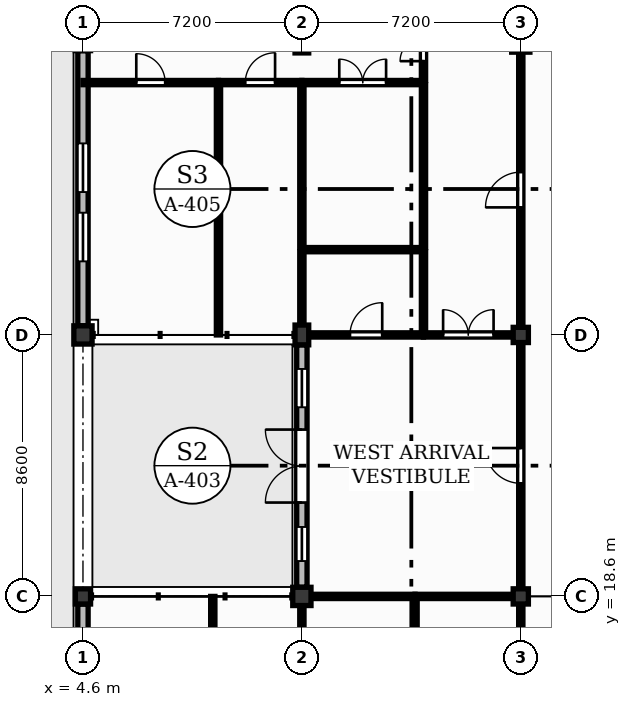
"""IFC4 building model, lengths in metres.
Left out: names, types, materials, properties, quantities, classifications, styles, units other than length and angle.
Written with IfcOpenShell. Run it as: python <this file> out.ifc"""

import sys

from ifc_helpers import new_model, si_unit, direction, frame, frame_2d, origin, origin_2d, place, context, subcontext, project, spatial, rectangle, extrude, element, fill, save


model = new_model("IFC4")
c1 = context("Model", 3, precision=1e-05, world=origin(), true_north=direction((0.0, 1.0)))
c2 = subcontext(c1, "Body", "Model", "MODEL_VIEW")
j1 = project(units=[si_unit("LENGTHUNIT", "METRE"), si_unit("PLANEANGLEUNIT", "RADIAN")], contexts=[c1])
p1 = place(None, origin())
s1 = spatial("IfcSite", under=j1, at=p1, CompositionType="ELEMENT")
p2 = place(p1, origin())
s2 = spatial("IfcBuilding", under=s1, at=p2, CompositionType="ELEMENT")
p3 = place(p2, origin())
s3 = spatial("IfcBuildingStorey", under=s2, at=p3, CompositionType="ELEMENT", Elevation=0.0)
p4 = place(p3, frame((4.6, 18.6, 0.0), z_axis=(0.0, 0.0, 1.0), x_axis=(1.0, 0.0, 0.0)))
e1 = element("IfcColumn", 1, at=p4, inside=s3, PredefinedType="COLUMN", context=c2, shape_type="SweptSolid", body=[
    extrude(rectangle(XDim=0.5, YDim=0.5, at=origin_2d()), origin(), (0.0, 0.0, 1.0), 4.2),
])
for number, where, z_axis, x_axis in (
    (2, (4.6, 27.2, 0.0), (0.0, 0.0, 1.0), (1.0, 0.0, 0.0)),
    (3, (11.8, 18.6, 0.0), (0.0, 0.0, 1.0), (1.0, 0.0, 0.0)),
):
    element("IfcColumn", number, at=place(p3, frame(where, z_axis=z_axis, x_axis=x_axis)), inside=s3, PredefinedType="COLUMN", context=c2, shape_type="SweptSolid", body=[
        extrude(rectangle(XDim=0.6, YDim=0.6, at=origin_2d()), origin(), (0.0, 0.0, 1.0), 4.2),
    ])
for number, where, z_axis, x_axis in (
    (4, (11.8, 27.2, 0.0), (0.0, 0.0, 1.0), (1.0, 0.0, 0.0)),
    (5, (11.8, 36.8, 0.0), (0.0, 0.0, 1.0), (1.0, 0.0, 0.0)),
):
    element("IfcColumn", number, at=place(p3, frame(where, z_axis=z_axis, x_axis=x_axis)), inside=s3, PredefinedType="COLUMN", context=c2, shape_type="SweptSolid", body=[
        extrude(rectangle(XDim=0.45, YDim=0.65, at=origin_2d()), origin(), (0.0, 0.0, 1.0), 4.2),
    ])
for number, where, z_axis, x_axis in (
    (6, (19.0, 18.6, 0.0), (0.0, 0.0, 1.0), (1.0, 0.0, 0.0)),
    (7, (19.0, 27.2, 0.0), (0.0, 0.0, 1.0), (1.0, 0.0, 0.0)),
):
    element("IfcColumn", number, at=place(p3, frame(where, z_axis=z_axis, x_axis=x_axis)), inside=s3, PredefinedType="COLUMN", context=c2, shape_type="SweptSolid", body=[
        extrude(rectangle(XDim=0.5, YDim=0.5, at=origin_2d()), origin(), (0.0, 0.0, 1.0), 4.2),
    ])
p5 = place(p3, frame((4.6, 11.65, 0.0), z_axis=(0.0, 0.0, 1.0), x_axis=(0.0, 1.0, 0.0)))
e8 = element("IfcWall", 8, at=p5, inside=s3, PredefinedType="SOLIDWALL", context=c2, shape_type="SweptSolid", body=[
    extrude(rectangle(XDim=6.7, YDim=0.34, at=frame_2d((3.35, 0.0))), origin(), (0.0, 0.0, 1.0), 3.68),
])
p6 = place(p5, frame((3.425, 0.0, 1.0)))
e9 = element("IfcOpeningElement", 9, at=p6, cuts=e8, PredefinedType="OPENING", context=c2, shape_type="SweptSolid", body=[
    extrude(rectangle(XDim=1.48, YDim=2.2, at=frame_2d((0.74, 1.1))), frame((0.0, 0.18, 0.0), z_axis=(0.0, -1.0, 0.0), x_axis=(1.0, 0.0, 0.0)), (0.0, 0.0, 1.0), 0.36),
])
p7 = place(p3, frame((4.6, 27.5, 0.0), z_axis=(0.0, 0.0, 1.0), x_axis=(0.0, 1.0, 0.0)))
e10 = element("IfcWall", 10, at=p7, inside=s3, PredefinedType="SOLIDWALL", context=c2, shape_type="SweptSolid", body=[
    extrude(rectangle(XDim=9.05, YDim=0.34, at=frame_2d((4.525, 0.0))), origin(), (0.0, 0.0, 1.0), 3.68),
])
p8 = place(p7, frame((2.12, 0.0, 1.0)))
e11 = element("IfcOpeningElement", 11, at=p8, cuts=e10, PredefinedType="OPENING", context=c2, shape_type="SweptSolid", body=[
    extrude(rectangle(XDim=1.6, YDim=2.2, at=frame_2d((0.8, 1.1))), frame((0.0, 0.18, 0.0), z_axis=(0.0, -1.0, 0.0), x_axis=(1.0, 0.0, 0.0)), (0.0, 0.0, 1.0), 0.36),
])
p9 = place(p7, frame((4.4, 0.0, 1.0)))
e12 = element("IfcOpeningElement", 12, at=p9, cuts=e10, PredefinedType="OPENING", context=c2, shape_type="SweptSolid", body=[
    extrude(rectangle(XDim=1.6, YDim=2.2, at=frame_2d((0.8, 1.1))), frame((0.0, 0.18, 0.0), z_axis=(0.0, -1.0, 0.0), x_axis=(1.0, 0.0, 0.0)), (0.0, 0.0, 1.0), 0.36),
])
p10 = place(p3, frame((11.8, 18.9, 0.0), z_axis=(0.0, 0.0, 1.0), x_axis=(0.0, 1.0, 0.0)))
e13 = element("IfcWall", 13, at=p10, inside=s3, PredefinedType="SOLIDWALL", context=c2, shape_type="SweptSolid", body=[
    extrude(rectangle(XDim=7.975, YDim=0.34, at=frame_2d((3.988, 0.0))), origin(), (0.0, 0.0, 1.0), 3.68),
])
p11 = place(p10, frame((2.788, 0.0, 0.0)))
e14 = element("IfcOpeningElement", 14, at=p11, cuts=e13, PredefinedType="OPENING", context=c2, shape_type="SweptSolid", body=[
    extrude(rectangle(XDim=2.4, YDim=2.8, at=frame_2d((1.2, 1.4))), frame((0.0, 0.18, 0.0), z_axis=(0.0, -1.0, 0.0), x_axis=(1.0, 0.0, 0.0)), (0.0, 0.0, 1.0), 0.36),
])
p12 = place(p10, frame((0.864, 0.0, 1.05)))
e15 = element("IfcOpeningElement", 15, at=p12, cuts=e13, PredefinedType="OPENING", context=c2, shape_type="SweptSolid", body=[
    extrude(rectangle(XDim=1.12, YDim=1.65, at=frame_2d((0.56, 0.825))), frame((0.0, 0.18, 0.0), z_axis=(0.0, -1.0, 0.0), x_axis=(1.0, 0.0, 0.0)), (0.0, 0.0, 1.0), 0.36),
])
p13 = place(p10, frame((5.921, 0.0, 1.05)))
e16 = element("IfcOpeningElement", 16, at=p13, cuts=e13, PredefinedType="OPENING", context=c2, shape_type="SweptSolid", body=[
    extrude(rectangle(XDim=1.26, YDim=1.65, at=frame_2d((0.63, 0.825))), frame((0.0, 0.18, 0.0), z_axis=(0.0, -1.0, 0.0), x_axis=(1.0, 0.0, 0.0)), (0.0, 0.0, 1.0), 0.36),
])
p14 = place(p3, frame((4.6, 35.5, 0.0), z_axis=(0.0, 0.0, 1.0), x_axis=(1.0, 0.0, 0.0)))
e17 = element("IfcWall", 17, at=p14, inside=s3, PredefinedType="PARTITIONING", context=c2, shape_type="SweptSolid", body=[
    extrude(rectangle(XDim=4.457, YDim=0.14, at=frame_2d((2.229, 0.0))), origin(), (0.0, 0.0, 1.0), 4.18),
])
p15 = place(p14, frame((1.753, 0.0, 0.0)))
e18 = element("IfcOpeningElement", 18, at=p15, cuts=e17, PredefinedType="OPENING", context=c2, shape_type="SweptSolid", body=[
    extrude(rectangle(XDim=0.95, YDim=2.1, at=frame_2d((0.475, 1.05))), frame((0.0, 0.08, 0.0), z_axis=(0.0, -1.0, 0.0), x_axis=(1.0, 0.0, 0.0)), (0.0, 0.0, 1.0), 0.16),
])
p16 = place(p3, frame((8.87, 13.47, 0.0), z_axis=(0.0, 0.0, 1.0), x_axis=(0.0, 1.0, 0.0)))
e19 = element("IfcWall", 19, at=p16, inside=s3, PredefinedType="PARTITIONING", context=c2, shape_type="SweptSolid", body=[
    extrude(rectangle(XDim=5.13, YDim=0.14, at=frame_2d((2.565, 0.0))), origin(), (0.0, 0.0, 1.0), 4.18),
])
p17 = place(p3, frame((9.057, 27.2, 0.0), z_axis=(0.0, 0.0, 1.0), x_axis=(0.0, 1.0, 0.0)))
e20 = element("IfcWall", 20, at=p17, inside=s3, PredefinedType="PARTITIONING", context=c2, shape_type="SweptSolid", body=[
    extrude(rectangle(XDim=8.23, YDim=0.14, at=frame_2d((4.115, 0.0))), origin(), (0.0, 0.0, 1.0), 4.18),
])
p18 = place(p3, frame((9.057, 35.5, 0.0), z_axis=(0.0, 0.0, 1.0), x_axis=(1.0, 0.0, 0.0)))
e21 = element("IfcWall", 21, at=p18, inside=s3, PredefinedType="PARTITIONING", context=c2, shape_type="SweptSolid", body=[
    extrude(rectangle(XDim=2.743, YDim=0.14, at=frame_2d((1.372, 0.0))), origin(), (0.0, 0.0, 1.0), 4.18),
])
p19 = place(p18, frame((0.882, 0.0, 0.0)))
e22 = element("IfcOpeningElement", 22, at=p19, cuts=e21, PredefinedType="OPENING", context=c2, shape_type="SweptSolid", body=[
    extrude(rectangle(XDim=0.98, YDim=2.15, at=frame_2d((0.49, 1.075))), frame((0.0, 0.08, 0.0), z_axis=(0.0, -1.0, 0.0), x_axis=(1.0, 0.0, 0.0)), (0.0, 0.0, 1.0), 0.16),
])
p20 = place(p3, frame((11.8, 13.47, 0.0), z_axis=(0.0, 0.0, 1.0), x_axis=(0.0, 1.0, 0.0)))
e23 = element("IfcWall", 23, at=p20, inside=s3, PredefinedType="PARTITIONING", context=c2, shape_type="SweptSolid", body=[
    extrude(rectangle(XDim=4.83, YDim=0.14, at=frame_2d((2.415, 0.0))), origin(), (0.0, 0.0, 1.0), 3.5),
])
p21 = place(p3, frame((12.1, 18.6, 0.0), z_axis=(0.0, 0.0, 1.0), x_axis=(1.0, 0.0, 0.0)))
e24 = element("IfcWall", 24, at=p21, inside=s3, PredefinedType="PARTITIONING", context=c2, shape_type="SweptSolid", body=[
    extrude(rectangle(XDim=3.422, YDim=0.14, at=frame_2d((1.711, 0.0))), origin(), (0.0, 0.0, 1.0), 3.25),
])
p22 = place(p3, frame((11.8, 27.525, 0.0), z_axis=(0.0, 0.0, 1.0), x_axis=(0.0, 1.0, 0.0)))
e25 = element("IfcWall", 25, at=p22, inside=s3, PredefinedType="PARTITIONING", context=c2, shape_type="SweptSolid", body=[
    extrude(rectangle(XDim=2.41, YDim=0.14, at=frame_2d((1.205, 0.0))), origin(), (0.0, 0.0, 1.0), 3.4),
])
p23 = place(p3, frame((12.025, 27.2, 0.0), z_axis=(0.0, 0.0, 1.0), x_axis=(1.0, 0.0, 0.0)))
e26 = element("IfcWall", 26, at=p23, inside=s3, PredefinedType="PARTITIONING", context=c2, shape_type="SweptSolid", body=[
    extrude(rectangle(XDim=3.775, YDim=0.14, at=frame_2d((1.888, 0.0))), origin(), (0.0, 0.0, 1.0), 3.68),
])
p24 = place(p23, frame((1.357, 0.0, 0.0)))
e27 = element("IfcOpeningElement", 27, at=p24, cuts=e26, PredefinedType="OPENING", context=c2, shape_type="SweptSolid", body=[
    extrude(rectangle(XDim=1.06, YDim=2.15, at=frame_2d((0.53, 1.075))), frame((0.0, 0.08, 0.0), z_axis=(0.0, -1.0, 0.0), x_axis=(1.0, 0.0, 0.0)), (0.0, 0.0, 1.0), 0.16),
])
p25 = place(p3, frame((11.8, 30.075, 0.0), z_axis=(0.0, 0.0, 1.0), x_axis=(0.0, 1.0, 0.0)))
e28 = element("IfcWall", 28, at=p25, inside=s3, PredefinedType="PARTITIONING", context=c2, shape_type="SweptSolid", body=[
    extrude(rectangle(XDim=5.355, YDim=0.14, at=frame_2d((2.677, 0.0))), origin(), (0.0, 0.0, 1.0), 3.4),
])
p26 = place(p3, frame((11.8, 30.005, 0.0), z_axis=(0.0, 0.0, 1.0), x_axis=(1.0, 0.0, 0.0)))
e29 = element("IfcWall", 29, at=p26, inside=s3, PredefinedType="PARTITIONING", context=c2, shape_type="SweptSolid", body=[
    extrude(rectangle(XDim=4.0, YDim=0.14, at=frame_2d((2.0, 0.0))), origin(), (0.0, 0.0, 1.0), 4.18),
])
p27 = place(p3, frame((11.8, 35.5, 0.0), z_axis=(0.0, 0.0, 1.0), x_axis=(1.0, 0.0, 0.0)))
e30 = element("IfcWall", 30, at=p27, inside=s3, PredefinedType="PARTITIONING", context=c2, shape_type="SweptSolid", body=[
    extrude(rectangle(XDim=4.0, YDim=0.14, at=frame_2d((2.0, 0.0))), origin(), (0.0, 0.0, 1.0), 4.18),
])
p28 = place(p27, frame((1.23, 0.0, 0.0)))
e31 = element("IfcOpeningElement", 31, at=p28, cuts=e30, PredefinedType="OPENING", context=c2, shape_type="SweptSolid", body=[
    extrude(rectangle(XDim=1.54, YDim=2.25, at=frame_2d((0.77, 1.125))), frame((0.0, 0.08, 0.0), z_axis=(0.0, -1.0, 0.0), x_axis=(1.0, 0.0, 0.0)), (0.0, 0.0, 1.0), 0.16),
])
p29 = place(p3, frame((15.522, 13.47, 0.0), z_axis=(0.0, 0.0, 1.0), x_axis=(0.0, 1.0, 0.0)))
e32 = element("IfcWall", 32, at=p29, inside=s3, PredefinedType="PARTITIONING", context=c2, shape_type="SweptSolid", body=[
    extrude(rectangle(XDim=5.06, YDim=0.14, at=frame_2d((2.53, 0.0))), origin(), (0.0, 0.0, 1.0), 4.18),
])
p30 = place(p3, frame((15.522, 18.6, 0.0), z_axis=(0.0, 0.0, 1.0), x_axis=(1.0, 0.0, 0.0)))
e33 = element("IfcWall", 33, at=p30, inside=s3, PredefinedType="PARTITIONING", context=c2, shape_type="SweptSolid", body=[
    extrude(rectangle(XDim=3.228, YDim=0.14, at=frame_2d((1.614, 0.0))), origin(), (0.0, 0.0, 1.0), 3.25),
])
p31 = place(p3, frame((15.8, 27.27, 0.0), z_axis=(0.0, 0.0, 1.0), x_axis=(0.0, 1.0, 0.0)))
e34 = element("IfcWall", 34, at=p31, inside=s3, PredefinedType="PARTITIONING", context=c2, shape_type="SweptSolid", body=[
    extrude(rectangle(XDim=2.665, YDim=0.14, at=frame_2d((1.333, 0.0))), origin(), (0.0, 0.0, 1.0), 4.18),
])
p32 = place(p3, frame((15.8, 27.2, 0.0), z_axis=(0.0, 0.0, 1.0), x_axis=(1.0, 0.0, 0.0)))
e35 = element("IfcWall", 35, at=p32, inside=s3, PredefinedType="PARTITIONING", context=c2, shape_type="SweptSolid", body=[
    extrude(rectangle(XDim=2.95, YDim=0.14, at=frame_2d((1.475, 0.0))), origin(), (0.0, 0.0, 1.0), 3.68),
])
p33 = place(p32, frame((0.645, 0.0, 0.0)))
e36 = element("IfcOpeningElement", 36, at=p33, cuts=e35, PredefinedType="OPENING", context=c2, shape_type="SweptSolid", body=[
    extrude(rectangle(XDim=1.66, YDim=2.3, at=frame_2d((0.83, 1.15))), frame((0.0, 0.08, 0.0), z_axis=(0.0, -1.0, 0.0), x_axis=(1.0, 0.0, 0.0)), (0.0, 0.0, 1.0), 0.16),
])
p34 = place(p3, frame((15.8, 30.075, 0.0), z_axis=(0.0, 0.0, 1.0), x_axis=(0.0, 1.0, 0.0)))
e37 = element("IfcWall", 37, at=p34, inside=s3, PredefinedType="PARTITIONING", context=c2, shape_type="SweptSolid", body=[
    extrude(rectangle(XDim=5.355, YDim=0.14, at=frame_2d((2.677, 0.0))), origin(), (0.0, 0.0, 1.0), 4.18),
])
p35 = place(p3, frame((15.8, 35.57, 0.0), z_axis=(0.0, 0.0, 1.0), x_axis=(0.0, 1.0, 0.0)))
e38 = element("IfcWall", 38, at=p35, inside=s3, PredefinedType="PARTITIONING", context=c2, shape_type="SweptSolid", body=[
    extrude(rectangle(XDim=2.81, YDim=0.14, at=frame_2d((1.405, 0.0))), origin(), (0.0, 0.0, 1.0), 4.18),
])
p36 = place(p35, frame((0.635, 0.0, 0.0)))
e39 = element("IfcOpeningElement", 39, at=p36, cuts=e38, PredefinedType="OPENING", context=c2, shape_type="SweptSolid", body=[
    extrude(rectangle(XDim=1.54, YDim=2.25, at=frame_2d((0.77, 1.125))), frame((0.0, 0.08, 0.0), z_axis=(0.0, -1.0, 0.0), x_axis=(1.0, 0.0, 0.0)), (0.0, 0.0, 1.0), 0.16),
])
p37 = place(p3, frame((19.0, 13.47, 0.0), z_axis=(0.0, 0.0, 1.0), x_axis=(0.0, 1.0, 0.0)))
e40 = element("IfcWall", 40, at=p37, inside=s3, PredefinedType="PARTITIONING", context=c2, shape_type="SweptSolid", body=[
    extrude(rectangle(XDim=4.88, YDim=0.14, at=frame_2d((2.44, 0.0))), origin(), (0.0, 0.0, 1.0), 3.5),
])
p38 = place(p3, frame((19.0, 18.85, 0.0), z_axis=(0.0, 0.0, 1.0), x_axis=(0.0, 1.0, 0.0)))
e41 = element("IfcWall", 41, at=p38, inside=s3, PredefinedType="PARTITIONING", context=c2, shape_type="SweptSolid", body=[
    extrude(rectangle(XDim=8.1, YDim=0.14, at=frame_2d((4.05, 0.0))), origin(), (0.0, 0.0, 1.0), 3.68),
])
p39 = place(p38, frame((3.47, 0.0, 0.0)))
e42 = element("IfcOpeningElement", 42, at=p39, cuts=e41, PredefinedType="OPENING", context=c2, shape_type="SweptSolid", body=[
    extrude(rectangle(XDim=1.16, YDim=2.1, at=frame_2d((0.58, 1.05))), frame((0.0, 0.08, 0.0), z_axis=(0.0, -1.0, 0.0), x_axis=(1.0, 0.0, 0.0)), (0.0, 0.0, 1.0), 0.16),
])
p40 = place(p3, frame((19.0, 27.45, 0.0), z_axis=(0.0, 0.0, 1.0), x_axis=(0.0, 1.0, 0.0)))
e43 = element("IfcWall", 43, at=p40, inside=s3, PredefinedType="PARTITIONING", context=c2, shape_type="SweptSolid", body=[
    extrude(rectangle(XDim=9.05, YDim=0.14, at=frame_2d((4.525, 0.0))), origin(), (0.0, 0.0, 1.0), 3.4),
])
p41 = place(p40, frame((3.945, 0.0, 0.0)))
e44 = element("IfcOpeningElement", 44, at=p41, cuts=e43, PredefinedType="OPENING", context=c2, shape_type="SweptSolid", body=[
    extrude(rectangle(XDim=1.16, YDim=2.1, at=frame_2d((0.58, 1.05))), frame((0.0, 0.08, 0.0), z_axis=(0.0, -1.0, 0.0), x_axis=(1.0, 0.0, 0.0)), (0.0, 0.0, 1.0), 0.16),
])
p42 = place(p8, origin())
e45 = element("IfcWindow", 45, at=p42, inside=s3, PartitioningType="DOUBLE_PANEL_VERTICAL", PredefinedType="WINDOW", context=c2, shape_type="SweptSolid", body=[
    extrude(rectangle(XDim=1.6, YDim=2.2, at=frame_2d((0.8, 1.1))), frame((0.0, 0.03, 0.0), z_axis=(0.0, -1.0, 0.0), x_axis=(1.0, 0.0, 0.0)), (0.0, 0.0, 1.0), 0.06),
])
fill(e11, e45)
p43 = place(p9, origin())
e46 = element("IfcWindow", 46, at=p43, inside=s3, PartitioningType="DOUBLE_PANEL_VERTICAL", PredefinedType="WINDOW", context=c2, shape_type="SweptSolid", body=[
    extrude(rectangle(XDim=1.6, YDim=2.2, at=frame_2d((0.8, 1.1))), frame((0.0, 0.03, 0.0), z_axis=(0.0, -1.0, 0.0), x_axis=(1.0, 0.0, 0.0)), (0.0, 0.0, 1.0), 0.06),
])
fill(e12, e46)
p44 = place(p11, origin())
e47 = element("IfcDoor", 47, at=p44, inside=s3, OperationType="DOUBLE_DOOR_SINGLE_SWING", PredefinedType="DOOR", context=c2, shape_type="SweptSolid", body=[
    extrude(rectangle(XDim=2.4, YDim=2.8, at=frame_2d((1.2, 1.4))), frame((0.0, 0.025, 0.0), z_axis=(0.0, -1.0, 0.0), x_axis=(1.0, 0.0, 0.0)), (0.0, 0.0, 1.0), 0.05),
])
fill(e14, e47)
p45 = place(p12, origin())
e48 = element("IfcWindow", 48, at=p45, inside=s3, PartitioningType="SINGLE_PANEL", PredefinedType="WINDOW", context=c2, shape_type="SweptSolid", body=[
    extrude(rectangle(XDim=1.12, YDim=1.65, at=frame_2d((0.56, 0.825))), frame((0.0, 0.03, 0.0), z_axis=(0.0, -1.0, 0.0), x_axis=(1.0, 0.0, 0.0)), (0.0, 0.0, 1.0), 0.06),
])
fill(e15, e48)
p46 = place(p13, origin())
e49 = element("IfcWindow", 49, at=p46, inside=s3, PartitioningType="SINGLE_PANEL", PredefinedType="WINDOW", context=c2, shape_type="SweptSolid", body=[
    extrude(rectangle(XDim=1.26, YDim=1.65, at=frame_2d((0.63, 0.825))), frame((0.0, 0.03, 0.0), z_axis=(0.0, -1.0, 0.0), x_axis=(1.0, 0.0, 0.0)), (0.0, 0.0, 1.0), 0.06),
])
fill(e16, e49)
p47 = place(p36, origin())
e50 = element("IfcDoor", 50, at=p47, inside=s3, OperationType="DOUBLE_DOOR_SINGLE_SWING", PredefinedType="DOOR", context=c2, shape_type="SweptSolid", body=[
    extrude(rectangle(XDim=1.54, YDim=2.25, at=frame_2d((0.77, 1.125))), frame((0.0, 0.025, 0.0), z_axis=(0.0, -1.0, 0.0), x_axis=(1.0, 0.0, 0.0)), (0.0, 0.0, 1.0), 0.05),
])
fill(e39, e50)
p48 = place(p41, origin())
e51 = element("IfcDoor", 51, at=p48, inside=s3, OperationType="SINGLE_SWING_LEFT", PredefinedType="DOOR", context=c2, shape_type="SweptSolid", body=[
    extrude(rectangle(XDim=1.16, YDim=2.1, at=frame_2d((0.58, 1.05))), frame((0.0, 0.025, 0.0), z_axis=(0.0, -1.0, 0.0), x_axis=(1.0, 0.0, 0.0)), (0.0, 0.0, 1.0), 0.05),
])
fill(e44, e51)
p49 = place(p33, origin())
e52 = element("IfcDoor", 52, at=p49, inside=s3, OperationType="DOUBLE_DOOR_SINGLE_SWING", PredefinedType="DOOR", context=c2, shape_type="SweptSolid", body=[
    extrude(rectangle(XDim=1.66, YDim=2.3, at=frame_2d((0.83, 1.15))), frame((0.0, 0.025, 0.0), z_axis=(0.0, -1.0, 0.0), x_axis=(1.0, 0.0, 0.0)), (0.0, 0.0, 1.0), 0.05),
])
fill(e36, e52)
p50 = place(p39, origin())
e53 = element("IfcDoor", 53, at=p50, inside=s3, OperationType="SINGLE_SWING_RIGHT", PredefinedType="DOOR", context=c2, shape_type="SweptSolid", body=[
    extrude(rectangle(XDim=1.16, YDim=2.1, at=frame_2d((0.58, 1.05))), frame((0.0, 0.025, 0.0), z_axis=(0.0, -1.0, 0.0), x_axis=(1.0, 0.0, 0.0)), (0.0, 0.0, 1.0), 0.05),
])
fill(e42, e53)
p51 = place(p15, origin())
e54 = element("IfcDoor", 54, at=p51, inside=s3, OperationType="SINGLE_SWING_LEFT", PredefinedType="DOOR", context=c2, shape_type="SweptSolid", body=[
    extrude(rectangle(XDim=0.95, YDim=2.1, at=frame_2d((0.475, 1.05))), frame((0.0, 0.025, 0.0), z_axis=(0.0, -1.0, 0.0), x_axis=(1.0, 0.0, 0.0)), (0.0, 0.0, 1.0), 0.05),
])
fill(e18, e54)
p52 = place(p19, origin())
e55 = element("IfcDoor", 55, at=p52, inside=s3, OperationType="SINGLE_SWING_RIGHT", PredefinedType="DOOR", context=c2, shape_type="SweptSolid", body=[
    extrude(rectangle(XDim=0.98, YDim=2.15, at=frame_2d((0.49, 1.075))), frame((0.0, 0.025, 0.0), z_axis=(0.0, -1.0, 0.0), x_axis=(1.0, 0.0, 0.0)), (0.0, 0.0, 1.0), 0.05),
])
fill(e22, e55)
p53 = place(p24, origin())
e56 = element("IfcDoor", 56, at=p53, inside=s3, OperationType="SINGLE_SWING_RIGHT", PredefinedType="DOOR", context=c2, shape_type="SweptSolid", body=[
    extrude(rectangle(XDim=1.06, YDim=2.15, at=frame_2d((0.53, 1.075))), frame((0.0, 0.025, 0.0), z_axis=(0.0, -1.0, 0.0), x_axis=(1.0, 0.0, 0.0)), (0.0, 0.0, 1.0), 0.05),
])
fill(e27, e56)
p54 = place(p28, origin())
e57 = element("IfcDoor", 57, at=p54, inside=s3, OperationType="DOUBLE_DOOR_SINGLE_SWING", PredefinedType="DOOR", context=c2, shape_type="SweptSolid", body=[
    extrude(rectangle(XDim=1.54, YDim=2.25, at=frame_2d((0.77, 1.125))), frame((0.0, 0.025, 0.0), z_axis=(0.0, -1.0, 0.0), x_axis=(1.0, 0.0, 0.0)), (0.0, 0.0, 1.0), 0.05),
])
fill(e31, e57)
save(model, sys.argv[1])
